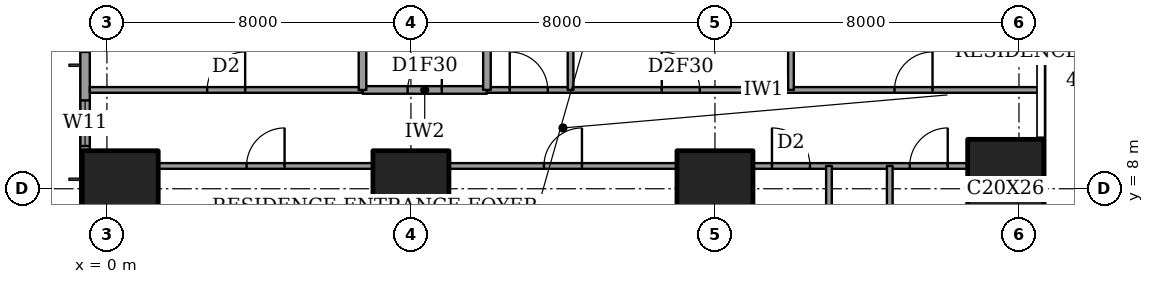
"""IFC4 building model, lengths in metres.
Left out: names, types, materials, properties, quantities, classifications, styles, units other than length and angle.
Written with IfcOpenShell. Run it as: python <this file> out.ifc"""

import sys

from ifc_helpers import new_model, si_unit, direction, frame, frame_2d, origin, origin_2d, place, context, subcontext, project, spatial, rectangle, extrude, element, fill, save


model = new_model("IFC4")
c1 = context("Model", 3, precision=1e-05, world=origin(), true_north=direction((0.0, 1.0)))
c2 = subcontext(c1, "Body", "Model", "MODEL_VIEW")
j1 = project(units=[si_unit("LENGTHUNIT", "METRE"), si_unit("PLANEANGLEUNIT", "RADIAN")], contexts=[c1])
p1 = place(None, origin())
s1 = spatial("IfcSite", under=j1, at=p1, CompositionType="ELEMENT")
p2 = place(p1, origin())
s2 = spatial("IfcBuilding", under=s1, at=p2, CompositionType="ELEMENT")
p3 = place(p2, frame((0.0, 0.0, 153.8)))
s3 = spatial("IfcBuildingStorey", under=s2, at=p3, CompositionType="ELEMENT", Elevation=153.8)
for number, where, z_axis, x_axis in (
    (1, (0.35, 8.0, 0.0), (0.0, 0.0, 1.0), (1.0, 0.0, 0.0)),
    (2, (8.0, 8.0, 0.0), (0.0, 0.0, 1.0), (1.0, 0.0, 0.0)),
    (3, (16.0, 8.0, 0.0), (0.0, 0.0, 1.0), (1.0, 0.0, 0.0)),
):
    element("IfcColumn", number, at=place(p3, frame(where, z_axis=z_axis, x_axis=x_axis)), inside=s3, PredefinedType="COLUMN", context=c2, shape_type="SweptSolid", body=[
        extrude(rectangle(XDim=2.0, YDim=2.0, at=origin_2d()), origin(), (0.0, 0.0, 1.0), 3.6),
    ])
p4 = place(p3, frame((23.65, 8.0, 0.0), z_axis=(0.0, 0.0, 1.0), x_axis=(1.0, 0.0, 0.0)))
e4 = element("IfcColumn", 4, at=p4, inside=s3, PredefinedType="COLUMN", context=c2, shape_type="SweptSolid", body=[
    extrude(rectangle(XDim=2.0, YDim=2.6, at=origin_2d()), origin(), (0.0, 0.0, 1.0), 3.6),
])
p5 = place(p3, frame((-0.575, 44.825, 0.0), z_axis=(0.0, 0.0, 1.0), x_axis=(0.0, -1.0, 0.0)))
e5 = element("IfcWall", 5, at=p5, inside=s3, PredefinedType="SOLIDWALL", context=c2, shape_type="SweptSolid", body=[
    extrude(rectangle(XDim=41.65, YDim=0.25, at=frame_2d((20.825, 0.0))), origin(), (0.0, 0.0, 1.0), 3.6),
])
p6 = place(p5, frame((0.775, 0.0, 0.4)))
e6 = element("IfcOpeningElement", 6, at=p6, cuts=e5, PredefinedType="OPENING", context=c2, shape_type="SweptSolid", body=[
    extrude(rectangle(XDim=2.4, YDim=2.2, at=frame_2d((1.2, 1.1))), frame((0.0, 0.135, 0.0), z_axis=(0.0, -1.0, 0.0), x_axis=(1.0, 0.0, 0.0)), (0.0, 0.0, 1.0), 0.27),
])
p7 = place(p5, frame((6.1, 0.0, 0.4)))
e7 = element("IfcOpeningElement", 7, at=p7, cuts=e5, PredefinedType="OPENING", context=c2, shape_type="SweptSolid", body=[
    extrude(rectangle(XDim=1.2, YDim=2.2, at=frame_2d((0.6, 1.1))), frame((0.0, 0.135, 0.0), z_axis=(0.0, -1.0, 0.0), x_axis=(1.0, 0.0, 0.0)), (0.0, 0.0, 1.0), 0.27),
])
p8 = place(p5, frame((8.425, 0.0, 0.4)))
e8 = element("IfcOpeningElement", 8, at=p8, cuts=e5, PredefinedType="OPENING", context=c2, shape_type="SweptSolid", body=[
    extrude(rectangle(XDim=2.4, YDim=2.2, at=frame_2d((1.2, 1.1))), frame((0.0, 0.135, 0.0), z_axis=(0.0, -1.0, 0.0), x_axis=(1.0, 0.0, 0.0)), (0.0, 0.0, 1.0), 0.27),
])
p9 = place(p5, frame((15.625, 0.0, 0.4)))
e9 = element("IfcOpeningElement", 9, at=p9, cuts=e5, PredefinedType="OPENING", context=c2, shape_type="SweptSolid", body=[
    extrude(rectangle(XDim=2.4, YDim=2.2, at=frame_2d((1.2, 1.1))), frame((0.0, 0.135, 0.0), z_axis=(0.0, -1.0, 0.0), x_axis=(1.0, 0.0, 0.0)), (0.0, 0.0, 1.0), 0.27),
])
p10 = place(p5, frame((23.625, 0.0, 0.4)))
e10 = element("IfcOpeningElement", 10, at=p10, cuts=e5, PredefinedType="OPENING", context=c2, shape_type="SweptSolid", body=[
    extrude(rectangle(XDim=2.4, YDim=2.2, at=frame_2d((1.2, 1.1))), frame((0.0, 0.135, 0.0), z_axis=(0.0, -1.0, 0.0), x_axis=(1.0, 0.0, 0.0)), (0.0, 0.0, 1.0), 0.27),
])
p11 = place(p5, frame((30.825, 0.0, 0.4)))
e11 = element("IfcOpeningElement", 11, at=p11, cuts=e5, PredefinedType="OPENING", context=c2, shape_type="SweptSolid", body=[
    extrude(rectangle(XDim=2.4, YDim=2.2, at=frame_2d((1.2, 1.1))), frame((0.0, 0.135, 0.0), z_axis=(0.0, -1.0, 0.0), x_axis=(1.0, 0.0, 0.0)), (0.0, 0.0, 1.0), 0.27),
])
p12 = place(p5, frame((34.5, 0.0, 0.4)))
e12 = element("IfcOpeningElement", 12, at=p12, cuts=e5, PredefinedType="OPENING", context=c2, shape_type="SweptSolid", body=[
    extrude(rectangle(XDim=1.2, YDim=2.2, at=frame_2d((0.6, 1.1))), frame((0.0, 0.135, 0.0), z_axis=(0.0, -1.0, 0.0), x_axis=(1.0, 0.0, 0.0)), (0.0, 0.0, 1.0), 0.27),
])
p13 = place(p5, frame((38.475, 0.0, 0.4)))
e13 = element("IfcOpeningElement", 13, at=p13, cuts=e5, PredefinedType="OPENING", context=c2, shape_type="SweptSolid", body=[
    extrude(rectangle(XDim=2.4, YDim=2.2, at=frame_2d((1.2, 1.1))), frame((0.0, 0.135, 0.0), z_axis=(0.0, -1.0, 0.0), x_axis=(1.0, 0.0, 0.0)), (0.0, 0.0, 1.0), 0.27),
])
p14 = place(p3, frame((1.35, 8.6, 0.0), z_axis=(0.0, 0.0, 1.0), x_axis=(1.0, 0.0, 0.0)))
e14 = element("IfcWall", 14, at=p14, inside=s3, PredefinedType="PARTITIONING", context=c2, shape_type="SweptSolid", body=[
    extrude(rectangle(XDim=5.65, YDim=0.15, at=frame_2d((2.825, 0.0))), origin(), (0.0, 0.0, 1.0), 3.35),
])
p15 = place(p14, frame((2.325, 0.0, 0.0)))
e15 = element("IfcOpeningElement", 15, at=p15, cuts=e14, PredefinedType="OPENING", context=c2, shape_type="SweptSolid", body=[
    extrude(rectangle(XDim=1.0, YDim=2.1, at=frame_2d((0.5, 1.05))), frame((0.0, 0.085, 0.0), z_axis=(0.0, -1.0, 0.0), x_axis=(1.0, 0.0, 0.0)), (0.0, 0.0, 1.0), 0.17),
])
p16 = place(p3, frame((9.0, 8.6, 0.0), z_axis=(0.0, 0.0, 1.0), x_axis=(1.0, 0.0, 0.0)))
e16 = element("IfcWall", 16, at=p16, inside=s3, PredefinedType="PARTITIONING", context=c2, shape_type="SweptSolid", body=[
    extrude(rectangle(XDim=6.0, YDim=0.15, at=frame_2d((3.0, 0.0))), origin(), (0.0, 0.0, 1.0), 3.35),
])
p17 = place(p16, frame((2.5, 0.0, 0.0)))
e17 = element("IfcOpeningElement", 17, at=p17, cuts=e16, PredefinedType="OPENING", context=c2, shape_type="SweptSolid", body=[
    extrude(rectangle(XDim=1.0, YDim=2.1, at=frame_2d((0.5, 1.05))), frame((0.0, 0.085, 0.0), z_axis=(0.0, -1.0, 0.0), x_axis=(1.0, 0.0, 0.0)), (0.0, 0.0, 1.0), 0.17),
])
p18 = place(p3, frame((17.0, 8.6, 0.0), z_axis=(0.0, 0.0, 1.0), x_axis=(1.0, 0.0, 0.0)))
e18 = element("IfcWall", 18, at=p18, inside=s3, PredefinedType="PARTITIONING", context=c2, shape_type="SweptSolid", body=[
    extrude(rectangle(XDim=5.65, YDim=0.15, at=frame_2d((2.825, 0.0))), origin(), (0.0, 0.0, 1.0), 3.35),
])
p19 = place(p18, frame((0.5, 0.0, 0.0)))
e19 = element("IfcOpeningElement", 19, at=p19, cuts=e18, PredefinedType="OPENING", context=c2, shape_type="SweptSolid", body=[
    extrude(rectangle(XDim=1.0, YDim=2.1, at=frame_2d((0.5, 1.05))), frame((0.0, 0.085, 0.0), z_axis=(0.0, -1.0, 0.0), x_axis=(1.0, 0.0, 0.0)), (0.0, 0.0, 1.0), 0.17),
])
p20 = place(p18, frame((4.125, 0.0, 0.0)))
e20 = element("IfcOpeningElement", 20, at=p20, cuts=e18, PredefinedType="OPENING", context=c2, shape_type="SweptSolid", body=[
    extrude(rectangle(XDim=1.0, YDim=2.1, at=frame_2d((0.5, 1.05))), frame((0.0, 0.085, 0.0), z_axis=(0.0, -1.0, 0.0), x_axis=(1.0, 0.0, 0.0)), (0.0, 0.0, 1.0), 0.17),
])
p21 = place(p3, frame((6.725, 10.6, 0.0), z_axis=(0.0, 0.0, 1.0), x_axis=(1.0, 0.0, 0.0)))
e21 = element("IfcWall", 21, at=p21, inside=s3, PredefinedType="PARTITIONING", context=c2, shape_type="SweptSolid", body=[
    extrude(rectangle(XDim=3.275, YDim=0.2, at=frame_2d((1.637, 0.0))), origin(), (0.0, 0.0, 1.0), 3.35),
])
p22 = place(p21, frame((1.188, 0.0, 0.0)))
e22 = element("IfcOpeningElement", 22, at=p22, cuts=e21, PredefinedType="OPENING", context=c2, shape_type="SweptSolid", body=[
    extrude(rectangle(XDim=0.9, YDim=2.1, at=frame_2d((0.45, 1.05))), frame((0.0, 0.11, 0.0), z_axis=(0.0, -1.0, 0.0), x_axis=(1.0, 0.0, 0.0)), (0.0, 0.0, 1.0), 0.22),
])
p23 = place(p3, frame((-0.45, 10.6, 0.0), z_axis=(0.0, 0.0, 1.0), x_axis=(1.0, 0.0, 0.0)))
e23 = element("IfcWall", 23, at=p23, inside=s3, PredefinedType="PARTITIONING", context=c2, shape_type="SweptSolid", body=[
    extrude(rectangle(XDim=7.175, YDim=0.15, at=frame_2d((3.587, 0.0))), origin(), (0.0, 0.0, 1.0), 3.35),
])
p24 = place(p23, frame((3.087, 0.0, 0.0)))
e24 = element("IfcOpeningElement", 24, at=p24, cuts=e23, PredefinedType="OPENING", context=c2, shape_type="SweptSolid", body=[
    extrude(rectangle(XDim=1.0, YDim=2.1, at=frame_2d((0.5, 1.05))), frame((0.0, 0.085, 0.0), z_axis=(0.0, -1.0, 0.0), x_axis=(1.0, 0.0, 0.0)), (0.0, 0.0, 1.0), 0.17),
])
p25 = place(p3, frame((10.0, 10.6, 0.0), z_axis=(0.0, 0.0, 1.0), x_axis=(1.0, 0.0, 0.0)))
e25 = element("IfcWall", 25, at=p25, inside=s3, PredefinedType="PARTITIONING", context=c2, shape_type="SweptSolid", body=[
    extrude(rectangle(XDim=14.561, YDim=0.15, at=frame_2d((7.281, 0.0))), origin(), (0.0, 0.0, 1.0), 3.35),
])
p26 = place(p25, frame((0.6, 0.0, 0.0)))
e26 = element("IfcOpeningElement", 26, at=p26, cuts=e25, PredefinedType="OPENING", context=c2, shape_type="SweptSolid", body=[
    extrude(rectangle(XDim=1.0, YDim=2.1, at=frame_2d((0.5, 1.05))), frame((0.0, 0.085, 0.0), z_axis=(0.0, -1.0, 0.0), x_axis=(1.0, 0.0, 0.0)), (0.0, 0.0, 1.0), 0.17),
])
p27 = place(p25, frame((4.6, 0.0, 0.0)))
e27 = element("IfcOpeningElement", 27, at=p27, cuts=e25, PredefinedType="OPENING", context=c2, shape_type="SweptSolid", body=[
    extrude(rectangle(XDim=1.0, YDim=2.1, at=frame_2d((0.5, 1.05))), frame((0.0, 0.085, 0.0), z_axis=(0.0, -1.0, 0.0), x_axis=(1.0, 0.0, 0.0)), (0.0, 0.0, 1.0), 0.17),
])
p28 = place(p25, frame((10.725, 0.0, 0.0)))
e28 = element("IfcOpeningElement", 28, at=p28, cuts=e25, PredefinedType="OPENING", context=c2, shape_type="SweptSolid", body=[
    extrude(rectangle(XDim=1.0, YDim=2.1, at=frame_2d((0.5, 1.05))), frame((0.0, 0.085, 0.0), z_axis=(0.0, -1.0, 0.0), x_axis=(1.0, 0.0, 0.0)), (0.0, 0.0, 1.0), 0.17),
])
for number, where, z_axis, x_axis in (
    (29, (6.725, 10.6, 0.0), (0.0, 0.0, 1.0), (0.0, 1.0, 0.0)),
    (30, (10.0, 10.6, 0.0), (0.0, 0.0, 1.0), (0.0, 1.0, 0.0)),
):
    element("IfcWall", number, at=place(p3, frame(where, z_axis=z_axis, x_axis=x_axis)), inside=s3, PredefinedType="PARTITIONING", context=c2, shape_type="SweptSolid", body=[
        extrude(rectangle(XDim=3.4, YDim=0.2, at=frame_2d((1.7, 0.0))), origin(), (0.0, 0.0, 1.0), 3.35),
    ])
for number, where, z_axis, x_axis in (
    (31, (12.2, 10.6, 0.0), (0.0, 0.0, 1.0), (0.0, 1.0, 0.0)),
    (32, (18.0, 10.6, 0.0), (0.0, 0.0, 1.0), (0.0, 1.0, 0.0)),
):
    element("IfcWall", number, at=place(p3, frame(where, z_axis=z_axis, x_axis=x_axis)), inside=s3, PredefinedType="PARTITIONING", context=c2, shape_type="SweptSolid", body=[
        extrude(rectangle(XDim=6.4, YDim=0.15, at=frame_2d((3.2, 0.0))), origin(), (0.0, 0.0, 1.0), 3.35),
    ])
p29 = place(p3, frame((19.0, -0.45, 0.0), z_axis=(0.0, 0.0, 1.0), x_axis=(0.0, 1.0, 0.0)))
e33 = element("IfcWall", 33, at=p29, inside=s3, PredefinedType="PARTITIONING", context=c2, shape_type="SweptSolid", body=[
    extrude(rectangle(XDim=9.05, YDim=0.15, at=frame_2d((4.525, 0.0))), origin(), (0.0, 0.0, 1.0), 3.35),
])
p30 = place(p3, frame((20.6, -0.45, 0.0), z_axis=(0.0, 0.0, 1.0), x_axis=(0.0, 1.0, 0.0)))
e34 = element("IfcWall", 34, at=p30, inside=s3, PredefinedType="PARTITIONING", context=c2, shape_type="SweptSolid", body=[
    extrude(rectangle(XDim=9.05, YDim=0.15, at=frame_2d((4.525, 0.0))), origin(), (0.0, 0.0, 1.0), 3.35),
])
p31 = place(p30, frame((4.075, 0.0, 0.0)))
e35 = element("IfcOpeningElement", 35, at=p31, cuts=e34, PredefinedType="OPENING", context=c2, shape_type="SweptSolid", body=[
    extrude(rectangle(XDim=0.9, YDim=2.1, at=frame_2d((0.45, 1.05))), frame((0.0, 0.085, 0.0), z_axis=(0.0, -1.0, 0.0), x_axis=(1.0, 0.0, 0.0)), (0.0, 0.0, 1.0), 0.17),
])
p32 = place(p12, origin())
e36 = element("IfcWindow", 36, at=p32, inside=s3, PartitioningType="SINGLE_PANEL", PredefinedType="WINDOW", context=c2, shape_type="SweptSolid", body=[
    extrude(rectangle(XDim=1.2, YDim=2.2, at=frame_2d((0.6, 1.1))), frame((0.0, 0.03, 0.0), z_axis=(0.0, -1.0, 0.0), x_axis=(1.0, 0.0, 0.0)), (0.0, 0.0, 1.0), 0.06),
])
fill(e12, e36)
p33 = place(p15, origin())
e37 = element("IfcDoor", 37, at=p33, inside=s3, OperationType="SINGLE_SWING_LEFT", PredefinedType="DOOR", context=c2, shape_type="SweptSolid", body=[
    extrude(rectangle(XDim=1.0, YDim=2.1, at=frame_2d((0.5, 1.05))), frame((0.0, 0.025, 0.0), z_axis=(0.0, -1.0, 0.0), x_axis=(1.0, 0.0, 0.0)), (0.0, 0.0, 1.0), 0.05),
])
fill(e15, e37)
p34 = place(p17, origin())
e38 = element("IfcDoor", 38, at=p34, inside=s3, OperationType="SINGLE_SWING_LEFT", PredefinedType="DOOR", context=c2, shape_type="SweptSolid", body=[
    extrude(rectangle(XDim=1.0, YDim=2.1, at=frame_2d((0.5, 1.05))), frame((0.0, 0.025, 0.0), z_axis=(0.0, -1.0, 0.0), x_axis=(1.0, 0.0, 0.0)), (0.0, 0.0, 1.0), 0.05),
])
fill(e17, e38)
p35 = place(p19, origin())
e39 = element("IfcDoor", 39, at=p35, inside=s3, OperationType="SINGLE_SWING_RIGHT", PredefinedType="DOOR", context=c2, shape_type="SweptSolid", body=[
    extrude(rectangle(XDim=1.0, YDim=2.1, at=frame_2d((0.5, 1.05))), frame((0.0, 0.025, 0.0), z_axis=(0.0, -1.0, 0.0), x_axis=(1.0, 0.0, 0.0)), (0.0, 0.0, 1.0), 0.05),
])
fill(e19, e39)
p36 = place(p20, origin())
e40 = element("IfcDoor", 40, at=p36, inside=s3, OperationType="SINGLE_SWING_LEFT", PredefinedType="DOOR", context=c2, shape_type="SweptSolid", body=[
    extrude(rectangle(XDim=1.0, YDim=2.1, at=frame_2d((0.5, 1.05))), frame((0.0, 0.025, 0.0), z_axis=(0.0, -1.0, 0.0), x_axis=(1.0, 0.0, 0.0)), (0.0, 0.0, 1.0), 0.05),
])
fill(e20, e40)
p37 = place(p26, origin())
e41 = element("IfcDoor", 41, at=p37, inside=s3, OperationType="SINGLE_SWING_RIGHT", PredefinedType="DOOR", context=c2, shape_type="SweptSolid", body=[
    extrude(rectangle(XDim=1.0, YDim=2.1, at=frame_2d((0.5, 1.05))), frame((0.0, 0.025, 0.0), z_axis=(0.0, -1.0, 0.0), x_axis=(1.0, 0.0, 0.0)), (0.0, 0.0, 1.0), 0.05),
])
fill(e26, e41)
p38 = place(p24, origin())
e42 = element("IfcDoor", 42, at=p38, inside=s3, OperationType="SINGLE_SWING_LEFT", PredefinedType="DOOR", context=c2, shape_type="SweptSolid", body=[
    extrude(rectangle(XDim=1.0, YDim=2.1, at=frame_2d((0.5, 1.05))), frame((0.0, 0.025, 0.0), z_axis=(0.0, -1.0, 0.0), x_axis=(1.0, 0.0, 0.0)), (0.0, 0.0, 1.0), 0.05),
])
fill(e24, e42)
p39 = place(p22, origin())
e43 = element("IfcDoor", 43, at=p39, inside=s3, OperationType="SINGLE_SWING_LEFT", PredefinedType="DOOR", context=c2, shape_type="SweptSolid", body=[
    extrude(rectangle(XDim=0.9, YDim=2.1, at=frame_2d((0.45, 1.05))), frame((0.0, 0.025, 0.0), z_axis=(0.0, -1.0, 0.0), x_axis=(1.0, 0.0, 0.0)), (0.0, 0.0, 1.0), 0.05),
])
fill(e22, e43)
p40 = place(p27, origin())
e44 = element("IfcDoor", 44, at=p40, inside=s3, OperationType="SINGLE_SWING_RIGHT", PredefinedType="DOOR", context=c2, shape_type="SweptSolid", body=[
    extrude(rectangle(XDim=1.0, YDim=2.1, at=frame_2d((0.5, 1.05))), frame((0.0, 0.025, 0.0), z_axis=(0.0, -1.0, 0.0), x_axis=(1.0, 0.0, 0.0)), (0.0, 0.0, 1.0), 0.05),
])
fill(e27, e44)
p41 = place(p28, origin())
e45 = element("IfcDoor", 45, at=p41, inside=s3, OperationType="SINGLE_SWING_LEFT", PredefinedType="DOOR", context=c2, shape_type="SweptSolid", body=[
    extrude(rectangle(XDim=1.0, YDim=2.1, at=frame_2d((0.5, 1.05))), frame((0.0, 0.025, 0.0), z_axis=(0.0, -1.0, 0.0), x_axis=(1.0, 0.0, 0.0)), (0.0, 0.0, 1.0), 0.05),
])
fill(e28, e45)
save(model, sys.argv[1])
